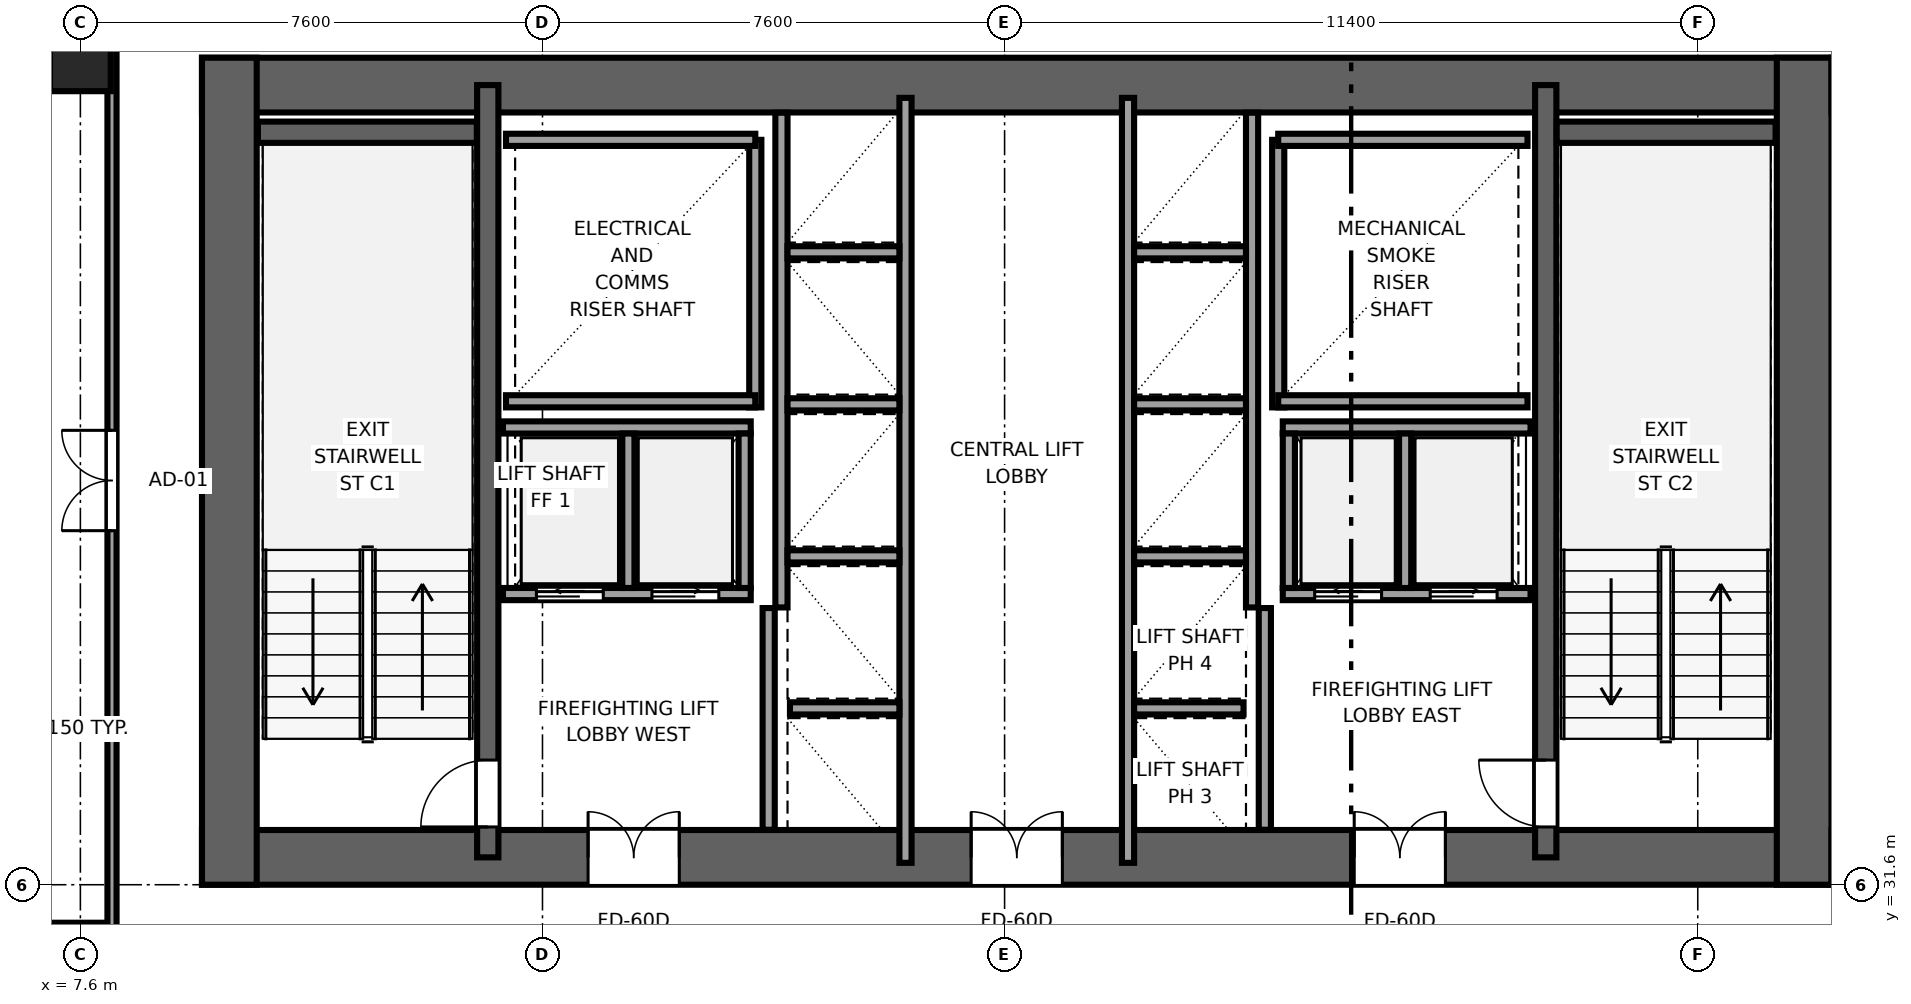
"""IFC4 building model, lengths in metres.
Left out: names, types, materials, properties, quantities, classifications, styles, units other than length and angle.
Written with IfcOpenShell. Run it as: python <this file> out.ifc"""

import sys

from ifc_helpers import new_model, si_unit, direction, frame, frame_2d, origin, origin_2d, place, context, subcontext, project, spatial, rectangle, extrude, source, transform, mapped, element, fill, save


model = new_model("IFC4")
c1 = context("Model", 3, precision=1e-05, world=origin(), true_north=direction((0.0, 1.0)))
c2 = subcontext(c1, "Body", "Model", "MODEL_VIEW")
j1 = project(units=[si_unit("LENGTHUNIT", "METRE"), si_unit("PLANEANGLEUNIT", "RADIAN")], contexts=[c1])
p1 = place(None, origin())
s1 = spatial("IfcSite", under=j1, at=p1, CompositionType="ELEMENT")
p2 = place(p1, origin())
s2 = spatial("IfcBuilding", under=s1, at=p2, CompositionType="ELEMENT")
p3 = place(p2, frame((0.0, 0.0, 74.6)))
s3 = spatial("IfcBuildingStorey", under=s2, at=p3, CompositionType="ELEMENT", Elevation=74.6)
p4 = place(p3, frame((9.6, 32.05, 0.0), z_axis=(0.0, 0.0, 1.0), x_axis=(1.0, 0.0, 0.0)))
e1 = element("IfcWall", 1, at=p4, inside=s3, PredefinedType="SHEAR", context=c2, shape_type="SweptSolid", body=[
    extrude(rectangle(XDim=26.8, YDim=0.9, at=frame_2d((13.4, 0.0))), origin(), (0.0, 0.0, 1.0), 3.55),
])
p5 = place(p4, frame((7.85, 0.0, 0.0), z_axis=(0.0, 0.0, 1.0), x_axis=(-1.0, 0.0, 0.0)))
e2 = element("IfcOpeningElement", 2, at=p5, cuts=e1, PredefinedType="OPENING", context=c2, shape_type="SweptSolid", body=[
    extrude(rectangle(XDim=1.5, YDim=2.04, at=frame_2d((0.75, 1.02))), frame((0.0, 0.46, 0.0), z_axis=(0.0, -1.0, 0.0), x_axis=(1.0, 0.0, 0.0)), (0.0, 0.0, 1.0), 0.92),
])
p6 = place(p4, frame((14.15, 0.0, 0.0), z_axis=(0.0, 0.0, 1.0), x_axis=(-1.0, 0.0, 0.0)))
e3 = element("IfcOpeningElement", 3, at=p6, cuts=e1, PredefinedType="OPENING", context=c2, shape_type="SweptSolid", body=[
    extrude(rectangle(XDim=1.5, YDim=2.04, at=frame_2d((0.75, 1.02))), frame((0.0, 0.46, 0.0), z_axis=(0.0, -1.0, 0.0), x_axis=(1.0, 0.0, 0.0)), (0.0, 0.0, 1.0), 0.92),
])
p7 = place(p4, frame((20.45, 0.0, 0.0), z_axis=(0.0, 0.0, 1.0), x_axis=(-1.0, 0.0, 0.0)))
e4 = element("IfcOpeningElement", 4, at=p7, cuts=e1, PredefinedType="OPENING", context=c2, shape_type="SweptSolid", body=[
    extrude(rectangle(XDim=1.5, YDim=2.04, at=frame_2d((0.75, 1.02))), frame((0.0, 0.46, 0.0), z_axis=(0.0, -1.0, 0.0), x_axis=(1.0, 0.0, 0.0)), (0.0, 0.0, 1.0), 0.92),
])
p8 = place(p3, frame((9.6, 44.75, 0.0), z_axis=(0.0, 0.0, 1.0), x_axis=(1.0, 0.0, 0.0)))
e5 = element("IfcWall", 5, at=p8, inside=s3, PredefinedType="SHEAR", context=c2, shape_type="SweptSolid", body=[
    extrude(rectangle(XDim=26.8, YDim=0.9, at=frame_2d((13.4, 0.0))), origin(), (0.0, 0.0, 1.0), 3.55),
])
for number, where, z_axis, x_axis in (
    (6, (10.05, 31.6, 0.0), (0.0, 0.0, 1.0), (0.0, 1.0, 0.0)),
    (7, (35.95, 31.6, 0.0), (0.0, 0.0, 1.0), (0.0, 1.0, 0.0)),
):
    element("IfcWall", number, at=place(p3, frame(where, z_axis=z_axis, x_axis=x_axis)), inside=s3, PredefinedType="SHEAR", context=c2, shape_type="SweptSolid", body=[
        extrude(rectangle(XDim=13.6, YDim=0.9, at=frame_2d((6.8, 0.0))), origin(), (0.0, 0.0, 1.0), 3.55),
    ])
p9 = place(p3, frame((14.3, 32.05, 0.0), z_axis=(0.0, 0.0, 1.0), x_axis=(0.0, 1.0, 0.0)))
e8 = element("IfcWall", 8, at=p9, inside=s3, PredefinedType="SHEAR", context=c2, shape_type="SweptSolid", body=[
    extrude(rectangle(XDim=12.7, YDim=0.35, at=frame_2d((6.35, 0.0))), origin(), (0.0, 0.0, 1.0), 3.55),
])
p10 = place(p9, frame((0.5, 0.0, 0.0)))
e9 = element("IfcOpeningElement", 9, at=p10, cuts=e8, PredefinedType="OPENING", context=c2, shape_type="SweptSolid", body=[
    extrude(rectangle(XDim=1.1, YDim=2.12, at=frame_2d((0.55, 1.06))), frame((0.0, 0.185, 0.0), z_axis=(0.0, -1.0, 0.0), x_axis=(1.0, 0.0, 0.0)), (0.0, 0.0, 1.0), 0.37),
])
p11 = place(p3, frame((31.7, 32.05, 0.0), z_axis=(0.0, 0.0, 1.0), x_axis=(0.0, 1.0, 0.0)))
e10 = element("IfcWall", 10, at=p11, inside=s3, PredefinedType="SHEAR", context=c2, shape_type="SweptSolid", body=[
    extrude(rectangle(XDim=12.7, YDim=0.35, at=frame_2d((6.35, 0.0))), origin(), (0.0, 0.0, 1.0), 3.55),
])
p12 = place(p11, frame((1.6, 0.0, 0.0), z_axis=(0.0, 0.0, 1.0), x_axis=(-1.0, 0.0, 0.0)))
e11 = element("IfcOpeningElement", 11, at=p12, cuts=e10, PredefinedType="OPENING", context=c2, shape_type="SweptSolid", body=[
    extrude(rectangle(XDim=1.1, YDim=2.12, at=frame_2d((0.55, 1.06))), frame((0.0, 0.185, 0.0), z_axis=(0.0, -1.0, 0.0), x_axis=(1.0, 0.0, 0.0)), (0.0, 0.0, 1.0), 0.37),
])
for number, where, z_axis, x_axis in (
    (12, (10.52, 43.975, 0.0), (0.0, 0.0, 1.0), (1.0, 0.0, 0.0)),
    (13, (31.88, 43.975, 0.0), (0.0, 0.0, 1.0), (1.0, 0.0, 0.0)),
):
    element("IfcWall", number, at=place(p3, frame(where, z_axis=z_axis, x_axis=x_axis)), inside=s3, PredefinedType="SHEAR", context=c2, shape_type="SweptSolid", body=[
        extrude(rectangle(XDim=3.6, YDim=0.35, at=frame_2d((1.8, 0.0))), origin(), (0.0, 0.0, 1.0), 3.55),
    ])
m1 = source(origin(), c2, "Body", "SweptSolid", [
    extrude(rectangle(XDim=1.0, YDim=1.0, at=origin_2d()), origin(), (0.0, 0.0, 1.0), 3.55),
])
p13 = place(p3, frame((7.6, 45.15, 0.0), z_axis=(0.0, 0.0, 1.0), x_axis=(1.0, 0.0, 0.0)))
e14 = element("IfcColumn", 14, at=p13, inside=s3, PredefinedType="COLUMN", context=c2, shape_type="MappedRepresentation", body=[
    mapped(m1, transform((0.0, 0.0, 0.0), x_axis=(1.0, 0.0, 0.0), y_axis=(0.0, 1.0, 0.0), z_axis=(0.0, 0.0, 1.0), scale=1.0)),
])
p14 = place(p3, frame((18.7, 39.45, 0.0), z_axis=(0.0, 0.0, 1.0), x_axis=(0.0, 1.0, 0.0)))
e15 = element("IfcWall", 15, at=p14, inside=s3, PredefinedType="SOLIDWALL", context=c2, shape_type="SweptSolid", body=[
    extrude(rectangle(XDim=4.4, YDim=0.2, at=frame_2d((2.2, 0.0))), origin(), (0.0, 0.0, 1.0), 3.37),
])
for number, where, z_axis, x_axis in (
    (16, (14.6, 39.55, 0.0), (0.0, 0.0, 1.0), (1.0, 0.0, 0.0)),
    (17, (14.6, 43.85, 0.0), (0.0, 0.0, 1.0), (1.0, 0.0, 0.0)),
):
    element("IfcWall", number, at=place(p3, frame(where, z_axis=z_axis, x_axis=x_axis)), inside=s3, PredefinedType="SOLIDWALL", context=c2, shape_type="SweptSolid", body=[
        extrude(rectangle(XDim=4.1, YDim=0.2, at=frame_2d((2.05, 0.0))), origin(), (0.0, 0.0, 1.0), 3.37),
    ])
p15 = place(p3, frame((27.3, 39.45, 0.0), z_axis=(0.0, 0.0, 1.0), x_axis=(0.0, 1.0, 0.0)))
e18 = element("IfcWall", 18, at=p15, inside=s3, PredefinedType="SOLIDWALL", context=c2, shape_type="SweptSolid", body=[
    extrude(rectangle(XDim=4.4, YDim=0.2, at=frame_2d((2.2, 0.0))), origin(), (0.0, 0.0, 1.0), 3.37),
])
for number, where, z_axis, x_axis in (
    (19, (27.3, 39.55, 0.0), (0.0, 0.0, 1.0), (1.0, 0.0, 0.0)),
    (20, (27.3, 43.85, 0.0), (0.0, 0.0, 1.0), (1.0, 0.0, 0.0)),
):
    element("IfcWall", number, at=place(p3, frame(where, z_axis=z_axis, x_axis=x_axis)), inside=s3, PredefinedType="SOLIDWALL", context=c2, shape_type="SweptSolid", body=[
        extrude(rectangle(XDim=4.1, YDim=0.2, at=frame_2d((2.05, 0.0))), origin(), (0.0, 0.0, 1.0), 3.37),
    ])
for number, where, z_axis, x_axis in (
    (21, (18.92, 32.504, 0.0), (0.0, 0.0, 1.0), (0.0, 1.0, 0.0)),
    (22, (27.08, 32.504, 0.0), (0.0, 0.0, 1.0), (0.0, 1.0, 0.0)),
):
    element("IfcWall", number, at=place(p3, frame(where, z_axis=z_axis, x_axis=x_axis)), inside=s3, PredefinedType="SOLIDWALL", context=c2, shape_type="SweptSolid", body=[
        extrude(rectangle(XDim=3.646, YDim=0.2, at=frame_2d((1.823, 0.0))), origin(), (0.0, 0.0, 1.0), 3.37),
    ])
p16 = place(p3, frame((21.17, 31.96, 0.0), z_axis=(0.0, 0.0, 1.0), x_axis=(0.0, 1.0, 0.0)))
e23 = element("IfcWall", 23, at=p16, inside=s3, PredefinedType="SOLIDWALL", context=c2, shape_type="SweptSolid", body=[
    extrude(rectangle(XDim=12.58, YDim=0.2, at=frame_2d((6.29, 0.0))), origin(), (0.0, 0.0, 1.0), 3.37),
])
p17 = place(p3, frame((19.13, 36.16, 0.0), z_axis=(0.0, 0.0, 1.0), x_axis=(0.0, 1.0, 0.0)))
e24 = element("IfcWall", 24, at=p17, inside=s3, PredefinedType="SOLIDWALL", context=c2, shape_type="SweptSolid", body=[
    extrude(rectangle(XDim=8.136, YDim=0.2, at=frame_2d((4.068, 0.0))), origin(), (0.0, 0.0, 1.0), 3.37),
])
p18 = place(p3, frame((19.27, 34.5, 0.0), z_axis=(0.0, 0.0, 1.0), x_axis=(1.0, 0.0, 0.0)))
e25 = element("IfcWall", 25, at=p18, inside=s3, PredefinedType="SOLIDWALL", context=c2, shape_type="SweptSolid", body=[
    extrude(rectangle(XDim=1.8, YDim=0.2, at=frame_2d((0.9, 0.0))), origin(), (0.0, 0.0, 1.0), 3.37),
])
for number, where, z_axis, x_axis in (
    (26, (19.23, 37.0, 0.0), (0.0, 0.0, 1.0), (1.0, 0.0, 0.0)),
    (27, (19.23, 39.5, 0.0), (0.0, 0.0, 1.0), (1.0, 0.0, 0.0)),
    (28, (19.23, 42.0, 0.0), (0.0, 0.0, 1.0), (1.0, 0.0, 0.0)),
):
    element("IfcWall", number, at=place(p3, frame(where, z_axis=z_axis, x_axis=x_axis)), inside=s3, PredefinedType="SOLIDWALL", context=c2, shape_type="SweptSolid", body=[
        extrude(rectangle(XDim=1.84, YDim=0.2, at=frame_2d((0.92, 0.0))), origin(), (0.0, 0.0, 1.0), 3.37),
    ])
p19 = place(p3, frame((27.375, 36.38, 0.0), z_axis=(0.0, 0.0, 1.0), x_axis=(1.0, 0.0, 0.0)))
e29 = element("IfcWall", 29, at=p19, inside=s3, PredefinedType="SOLIDWALL", context=c2, shape_type="SweptSolid", body=[
    extrude(rectangle(XDim=4.075, YDim=0.2, at=frame_2d((2.038, 0.0))), origin(), (0.0, 0.0, 1.0), 3.37),
])
p20 = place(p19, frame((0.525, 0.0, 0.0)))
e30 = element("IfcOpeningElement", 30, at=p20, cuts=e29, PredefinedType="OPENING", context=c2, shape_type="SweptSolid", body=[
    extrude(rectangle(XDim=1.1, YDim=2.12, at=frame_2d((0.55, 1.06))), frame((0.0, 0.11, 0.0), z_axis=(0.0, -1.0, 0.0), x_axis=(1.0, 0.0, 0.0)), (0.0, 0.0, 1.0), 0.22),
])
p21 = place(p19, frame((2.425, 0.0, 0.0)))
e31 = element("IfcOpeningElement", 31, at=p21, cuts=e29, PredefinedType="OPENING", context=c2, shape_type="SweptSolid", body=[
    extrude(rectangle(XDim=1.1, YDim=2.12, at=frame_2d((0.55, 1.06))), frame((0.0, 0.11, 0.0), z_axis=(0.0, -1.0, 0.0), x_axis=(1.0, 0.0, 0.0)), (0.0, 0.0, 1.0), 0.22),
])
p22 = place(p3, frame((27.375, 39.12, 0.0), z_axis=(0.0, 0.0, 1.0), x_axis=(1.0, 0.0, 0.0)))
e32 = element("IfcWall", 32, at=p22, inside=s3, PredefinedType="SOLIDWALL", context=c2, shape_type="SweptSolid", body=[
    extrude(rectangle(XDim=4.075, YDim=0.2, at=frame_2d((2.038, 0.0))), origin(), (0.0, 0.0, 1.0), 3.37),
])
for number, where, z_axis, x_axis in (
    (33, (27.475, 36.48, 0.0), (0.0, 0.0, 1.0), (0.0, 1.0, 0.0)),
    (34, (29.387, 36.48, 0.0), (0.0, 0.0, 1.0), (0.0, 1.0, 0.0)),
):
    element("IfcWall", number, at=place(p3, frame(where, z_axis=z_axis, x_axis=x_axis)), inside=s3, PredefinedType="SOLIDWALL", context=c2, shape_type="SweptSolid", body=[
        extrude(rectangle(XDim=2.54, YDim=0.2, at=frame_2d((1.27, 0.0))), origin(), (0.0, 0.0, 1.0), 3.37),
    ])
p23 = place(p3, frame((14.55, 36.38, 0.0), z_axis=(0.0, 0.0, 1.0), x_axis=(1.0, 0.0, 0.0)))
e35 = element("IfcWall", 35, at=p23, inside=s3, PredefinedType="SOLIDWALL", context=c2, shape_type="SweptSolid", body=[
    extrude(rectangle(XDim=4.075, YDim=0.2, at=frame_2d((2.038, 0.0))), origin(), (0.0, 0.0, 1.0), 3.37),
])
p24 = place(p23, frame((0.55, 0.0, 0.0)))
e36 = element("IfcOpeningElement", 36, at=p24, cuts=e35, PredefinedType="OPENING", context=c2, shape_type="SweptSolid", body=[
    extrude(rectangle(XDim=1.1, YDim=2.12, at=frame_2d((0.55, 1.06))), frame((0.0, 0.11, 0.0), z_axis=(0.0, -1.0, 0.0), x_axis=(1.0, 0.0, 0.0)), (0.0, 0.0, 1.0), 0.22),
])
p25 = place(p23, frame((2.45, 0.0, 0.0)))
e37 = element("IfcOpeningElement", 37, at=p25, cuts=e35, PredefinedType="OPENING", context=c2, shape_type="SweptSolid", body=[
    extrude(rectangle(XDim=1.1, YDim=2.12, at=frame_2d((0.55, 1.06))), frame((0.0, 0.11, 0.0), z_axis=(0.0, -1.0, 0.0), x_axis=(1.0, 0.0, 0.0)), (0.0, 0.0, 1.0), 0.22),
])
p26 = place(p3, frame((14.55, 39.12, 0.0), z_axis=(0.0, 0.0, 1.0), x_axis=(1.0, 0.0, 0.0)))
e38 = element("IfcWall", 38, at=p26, inside=s3, PredefinedType="SOLIDWALL", context=c2, shape_type="SweptSolid", body=[
    extrude(rectangle(XDim=4.075, YDim=0.2, at=frame_2d((2.038, 0.0))), origin(), (0.0, 0.0, 1.0), 3.37),
])
for number, where, z_axis, x_axis in (
    (39, (18.525, 36.48, 0.0), (0.0, 0.0, 1.0), (0.0, 1.0, 0.0)),
    (40, (16.613, 36.48, 0.0), (0.0, 0.0, 1.0), (0.0, 1.0, 0.0)),
):
    element("IfcWall", number, at=place(p3, frame(where, z_axis=z_axis, x_axis=x_axis)), inside=s3, PredefinedType="SOLIDWALL", context=c2, shape_type="SweptSolid", body=[
        extrude(rectangle(XDim=2.54, YDim=0.2, at=frame_2d((1.27, 0.0))), origin(), (0.0, 0.0, 1.0), 3.37),
    ])
p27 = place(p3, frame((24.83, 31.96, 0.0), z_axis=(0.0, 0.0, 1.0), x_axis=(0.0, 1.0, 0.0)))
e41 = element("IfcWall", 41, at=p27, inside=s3, PredefinedType="SOLIDWALL", context=c2, shape_type="SweptSolid", body=[
    extrude(rectangle(XDim=12.58, YDim=0.2, at=frame_2d((6.29, 0.0))), origin(), (0.0, 0.0, 1.0), 3.37),
])
p28 = place(p3, frame((26.87, 36.16, 0.0), z_axis=(0.0, 0.0, 1.0), x_axis=(0.0, 1.0, 0.0)))
e42 = element("IfcWall", 42, at=p28, inside=s3, PredefinedType="SOLIDWALL", context=c2, shape_type="SweptSolid", body=[
    extrude(rectangle(XDim=8.136, YDim=0.2, at=frame_2d((4.068, 0.0))), origin(), (0.0, 0.0, 1.0), 3.37),
])
p29 = place(p3, frame((24.93, 34.5, 0.0), z_axis=(0.0, 0.0, 1.0), x_axis=(1.0, 0.0, 0.0)))
e43 = element("IfcWall", 43, at=p29, inside=s3, PredefinedType="SOLIDWALL", context=c2, shape_type="SweptSolid", body=[
    extrude(rectangle(XDim=1.8, YDim=0.2, at=frame_2d((0.9, 0.0))), origin(), (0.0, 0.0, 1.0), 3.37),
])
for number, where, z_axis, x_axis in (
    (44, (24.93, 37.0, 0.0), (0.0, 0.0, 1.0), (1.0, 0.0, 0.0)),
    (45, (24.93, 39.5, 0.0), (0.0, 0.0, 1.0), (1.0, 0.0, 0.0)),
    (46, (24.93, 42.0, 0.0), (0.0, 0.0, 1.0), (1.0, 0.0, 0.0)),
):
    element("IfcWall", number, at=place(p3, frame(where, z_axis=z_axis, x_axis=x_axis)), inside=s3, PredefinedType="SOLIDWALL", context=c2, shape_type="SweptSolid", body=[
        extrude(rectangle(XDim=1.84, YDim=0.2, at=frame_2d((0.92, 0.0))), origin(), (0.0, 0.0, 1.0), 3.37),
    ])
p30 = place(p3, frame((0.405, 30.9, 0.0), z_axis=(0.0, 0.0, 1.0), x_axis=(1.0, 0.0, 0.0)))
e47 = element("IfcWall", 47, at=p30, inside=s3, PredefinedType="PARTITIONING", context=c2, shape_type="SweptSolid", body=[
    extrude(rectangle(XDim=7.715, YDim=0.15, at=frame_2d((3.857, 0.0))), origin(), (0.0, 0.0, 1.0), 3.37),
])
p31 = place(p3, frame((8.12, 30.9, 0.0), z_axis=(0.0, 0.0, 1.0), x_axis=(0.0, 1.0, 0.0)))
e48 = element("IfcWall", 48, at=p31, inside=s3, PredefinedType="PARTITIONING", context=c2, shape_type="SweptSolid", body=[
    extrude(rectangle(XDim=14.695, YDim=0.15, at=frame_2d((7.348, 0.0))), origin(), (0.0, 0.0, 1.0), 3.37),
])
p32 = place(p31, frame((6.522, 0.0, 0.0)))
e49 = element("IfcOpeningElement", 49, at=p32, cuts=e48, PredefinedType="OPENING", context=c2, shape_type="SweptSolid", body=[
    extrude(rectangle(XDim=1.65, YDim=2.15, at=frame_2d((0.825, 1.075))), frame((0.0, 0.085, 0.0), z_axis=(0.0, -1.0, 0.0), x_axis=(1.0, 0.0, 0.0)), (0.0, 0.0, 1.0), 0.17),
])
m2 = source(origin(), c2, "Body", "SweptSolid", [
    extrude(rectangle(XDim=1.1, YDim=2.12, at=frame_2d((0.55, 1.06))), frame((0.0, 0.025, 0.0), z_axis=(0.0, -1.0, 0.0), x_axis=(1.0, 0.0, 0.0)), (0.0, 0.0, 1.0), 0.05),
])
p33 = place(p10, origin())
e50 = element("IfcDoor", 50, at=p33, inside=s3, OperationType="SINGLE_SWING_LEFT", PredefinedType="DOOR", context=c2, shape_type="MappedRepresentation", body=[
    mapped(m2, transform((0.0, 0.0, 0.0), x_axis=(1.0, 0.0, 0.0), y_axis=(0.0, 1.0, 0.0), z_axis=(0.0, 0.0, 1.0), scale=1.0)),
])
fill(e9, e50)
p34 = place(p12, origin())
e51 = element("IfcDoor", 51, at=p34, inside=s3, OperationType="SINGLE_SWING_RIGHT", PredefinedType="DOOR", context=c2, shape_type="MappedRepresentation", body=[
    mapped(m2, transform((0.0, 0.0, 0.0), x_axis=(1.0, 0.0, 0.0), y_axis=(0.0, 1.0, 0.0), z_axis=(0.0, 0.0, 1.0), scale=1.0)),
])
fill(e11, e51)
m3 = source(origin(), c2, "Body", "SweptSolid", [
    extrude(rectangle(XDim=1.5, YDim=2.04, at=frame_2d((0.75, 1.02))), frame((0.0, 0.025, 0.0), z_axis=(0.0, -1.0, 0.0), x_axis=(1.0, 0.0, 0.0)), (0.0, 0.0, 1.0), 0.05),
])
p35 = place(p5, origin())
e52 = element("IfcDoor", 52, at=p35, inside=s3, OperationType="DOUBLE_DOOR_SINGLE_SWING", PredefinedType="DOOR", context=c2, shape_type="MappedRepresentation", body=[
    mapped(m3, transform((0.0, 0.0, 0.0), x_axis=(1.0, 0.0, 0.0), y_axis=(0.0, 1.0, 0.0), z_axis=(0.0, 0.0, 1.0), scale=1.0)),
])
fill(e2, e52)
p36 = place(p6, origin())
e53 = element("IfcDoor", 53, at=p36, inside=s3, OperationType="DOUBLE_DOOR_SINGLE_SWING", PredefinedType="DOOR", context=c2, shape_type="MappedRepresentation", body=[
    mapped(m3, transform((0.0, 0.0, 0.0), x_axis=(1.0, 0.0, 0.0), y_axis=(0.0, 1.0, 0.0), z_axis=(0.0, 0.0, 1.0), scale=1.0)),
])
fill(e3, e53)
p37 = place(p7, origin())
e54 = element("IfcDoor", 54, at=p37, inside=s3, OperationType="DOUBLE_DOOR_SINGLE_SWING", PredefinedType="DOOR", context=c2, shape_type="MappedRepresentation", body=[
    mapped(m3, transform((0.0, 0.0, 0.0), x_axis=(1.0, 0.0, 0.0), y_axis=(0.0, 1.0, 0.0), z_axis=(0.0, 0.0, 1.0), scale=1.0)),
])
fill(e4, e54)
m4 = source(origin(), c2, "Body", "SweptSolid", [
    extrude(rectangle(XDim=1.1, YDim=2.12, at=frame_2d((0.55, 1.06))), frame((0.0, 0.025, 0.0), z_axis=(0.0, -1.0, 0.0), x_axis=(1.0, 0.0, 0.0)), (0.0, 0.0, 1.0), 0.05),
])
p38 = place(p20, origin())
e55 = element("IfcDoor", 55, at=p38, inside=s3, OperationType="SLIDING_TO_LEFT", PredefinedType="DOOR", context=c2, shape_type="MappedRepresentation", body=[
    mapped(m4, transform((0.0, 0.0, 0.0), x_axis=(1.0, 0.0, 0.0), y_axis=(0.0, 1.0, 0.0), z_axis=(0.0, 0.0, 1.0), scale=1.0)),
])
fill(e30, e55)
p39 = place(p21, origin())
e56 = element("IfcDoor", 56, at=p39, inside=s3, OperationType="SLIDING_TO_RIGHT", PredefinedType="DOOR", context=c2, shape_type="MappedRepresentation", body=[
    mapped(m4, transform((0.0, 0.0, 0.0), x_axis=(1.0, 0.0, 0.0), y_axis=(0.0, 1.0, 0.0), z_axis=(0.0, 0.0, 1.0), scale=1.0)),
])
fill(e31, e56)
p40 = place(p24, origin())
e57 = element("IfcDoor", 57, at=p40, inside=s3, OperationType="SLIDING_TO_LEFT", PredefinedType="DOOR", context=c2, shape_type="MappedRepresentation", body=[
    mapped(m4, transform((0.0, 0.0, 0.0), x_axis=(1.0, 0.0, 0.0), y_axis=(0.0, 1.0, 0.0), z_axis=(0.0, 0.0, 1.0), scale=1.0)),
])
fill(e36, e57)
p41 = place(p25, origin())
e58 = element("IfcDoor", 58, at=p41, inside=s3, OperationType="SLIDING_TO_RIGHT", PredefinedType="DOOR", context=c2, shape_type="MappedRepresentation", body=[
    mapped(m4, transform((0.0, 0.0, 0.0), x_axis=(1.0, 0.0, 0.0), y_axis=(0.0, 1.0, 0.0), z_axis=(0.0, 0.0, 1.0), scale=1.0)),
])
fill(e37, e58)
m5 = source(origin(), c2, "Body", "SweptSolid", [
    extrude(rectangle(XDim=1.65, YDim=2.15, at=frame_2d((0.825, 1.075))), frame((0.0, 0.025, 0.0), z_axis=(0.0, -1.0, 0.0), x_axis=(1.0, 0.0, 0.0)), (0.0, 0.0, 1.0), 0.05),
])
p42 = place(p32, origin())
e59 = element("IfcDoor", 59, at=p42, inside=s3, OperationType="DOUBLE_DOOR_SINGLE_SWING", PredefinedType="DOOR", context=c2, shape_type="MappedRepresentation", body=[
    mapped(m5, transform((0.0, 0.0, 0.0), x_axis=(1.0, 0.0, 0.0), y_axis=(0.0, 1.0, 0.0), z_axis=(0.0, 0.0, 1.0), scale=1.0)),
])
fill(e49, e59)
save(model, sys.argv[1])
